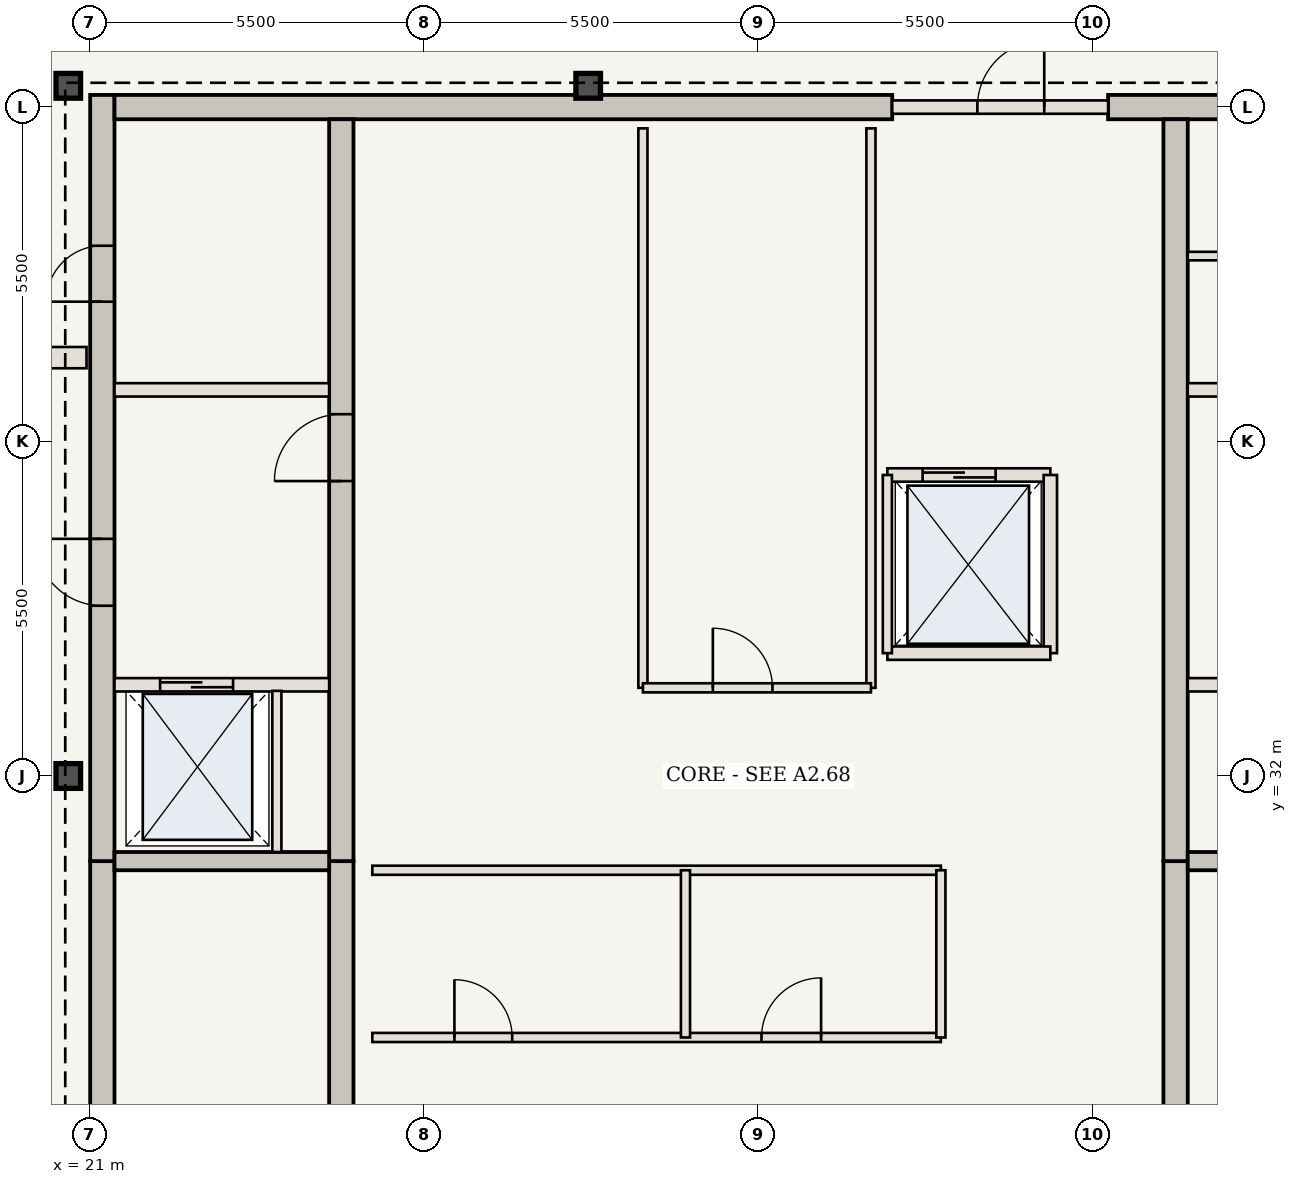
"""IFC4 building model, lengths in metres.
Left out: names, types, materials, properties, quantities, classifications, styles, units other than length and angle.
Written with IfcOpenShell. Run it as: python <this file> out.ifc"""

import sys

from ifc_helpers import new_model, si_unit, direction, frame, frame_2d, origin, origin_2d, place, context, subcontext, project, spatial, rectangle, i_section, extrude, element, fill, save


model = new_model("IFC4")
c1 = context("Model", 3, precision=1e-05, world=origin(), true_north=direction((0.0, 1.0)))
c2 = subcontext(c1, "Body", "Model", "MODEL_VIEW")
j1 = project(units=[si_unit("LENGTHUNIT", "METRE"), si_unit("PLANEANGLEUNIT", "RADIAN")], contexts=[c1])
p1 = place(None, origin())
s1 = spatial("IfcSite", under=j1, at=p1, CompositionType="ELEMENT")
p2 = place(p1, origin())
s2 = spatial("IfcBuilding", under=s1, at=p2, CompositionType="ELEMENT")
p3 = place(p2, frame((0.0, 0.0, 317.8)))
s3 = spatial("IfcBuildingStorey", under=s2, at=p3, CompositionType="ELEMENT", Elevation=317.8)
p4 = place(p3, frame((21.21, 20.75, 0.0), z_axis=(0.0, 0.0, 1.0), x_axis=(0.0, 1.0, 0.0)))
e1 = element("IfcWall", 1, at=p4, inside=s3, PredefinedType="SHEAR", context=c2, shape_type="SweptSolid", body=[
    extrude(rectangle(XDim=9.85, YDim=0.4, at=frame_2d((4.925, 0.0))), origin(), (0.0, 0.0, 1.0), 4.55),
])
p5 = place(p4, frame((1.0, 0.0, 0.0)))
e2 = element("IfcOpeningElement", 2, at=p5, cuts=e1, PredefinedType="OPENING", context=c2, shape_type="SweptSolid", body=[
    extrude(rectangle(XDim=1.15, YDim=2.15, at=frame_2d((0.575, 1.075))), frame((0.0, 0.21, 0.0), z_axis=(0.0, -1.0, 0.0), x_axis=(1.0, 0.0, 0.0)), (0.0, 0.0, 1.0), 0.42),
])
p6 = place(p3, frame((21.21, 30.6, 0.0), z_axis=(0.0, 0.0, 1.0), x_axis=(0.0, 1.0, 0.0)))
e3 = element("IfcWall", 3, at=p6, inside=s3, PredefinedType="SHEAR", context=c2, shape_type="SweptSolid", body=[
    extrude(rectangle(XDim=12.6, YDim=0.4, at=frame_2d((6.3, 0.0))), origin(), (0.0, 0.0, 1.0), 4.55),
])
p7 = place(p6, frame((4.2, 0.0, 0.0)))
e4 = element("IfcOpeningElement", 4, at=p7, cuts=e3, PredefinedType="OPENING", context=c2, shape_type="SweptSolid", body=[
    extrude(rectangle(XDim=1.1, YDim=2.15, at=frame_2d((0.55, 1.075))), frame((0.0, 0.21, 0.0), z_axis=(0.0, -1.0, 0.0), x_axis=(1.0, 0.0, 0.0)), (0.0, 0.0, 1.0), 0.42),
])
p8 = place(p6, frame((9.2, 0.0, 0.0)))
e5 = element("IfcOpeningElement", 5, at=p8, cuts=e3, PredefinedType="OPENING", context=c2, shape_type="SweptSolid", body=[
    extrude(rectangle(XDim=0.92, YDim=2.1, at=frame_2d((0.46, 1.05))), frame((0.0, 0.21, 0.0), z_axis=(0.0, -1.0, 0.0), x_axis=(1.0, 0.0, 0.0)), (0.0, 0.0, 1.0), 0.42),
])
p9 = place(p3, frame((21.41, 43.0, 0.0), z_axis=(0.0, 0.0, 1.0), x_axis=(1.0, 0.0, 0.0)))
e6 = element("IfcWall", 6, at=p9, inside=s3, PredefinedType="SHEAR", context=c2, shape_type="SweptSolid", body=[
    extrude(rectangle(XDim=12.79, YDim=0.4, at=frame_2d((6.395, 0.0))), origin(), (0.0, 0.0, 1.0), 4.55),
])
p10 = place(p3, frame((37.75, 43.0, 0.0), z_axis=(0.0, 0.0, 1.0), x_axis=(1.0, 0.0, 0.0)))
e7 = element("IfcWall", 7, at=p10, inside=s3, PredefinedType="SHEAR", context=c2, shape_type="SweptSolid", body=[
    extrude(rectangle(XDim=4.84, YDim=0.4, at=frame_2d((2.42, 0.0))), origin(), (0.0, 0.0, 1.0), 4.55),
])
p11 = place(p3, frame((25.14, 21.15, 0.0), z_axis=(0.0, 0.0, 1.0), x_axis=(0.0, 1.0, 0.0)))
e8 = element("IfcWall", 8, at=p11, inside=s3, PredefinedType="SHEAR", context=c2, shape_type="SweptSolid", body=[
    extrude(rectangle(XDim=9.45, YDim=0.4, at=frame_2d((4.725, 0.0))), origin(), (0.0, 0.0, 1.0), 4.55),
])
p12 = place(p3, frame((25.14, 30.6, 0.0), z_axis=(0.0, 0.0, 1.0), x_axis=(0.0, 1.0, 0.0)))
e9 = element("IfcWall", 9, at=p12, inside=s3, PredefinedType="SHEAR", context=c2, shape_type="SweptSolid", body=[
    extrude(rectangle(XDim=12.2, YDim=0.4, at=frame_2d((6.1, 0.0))), origin(), (0.0, 0.0, 1.0), 4.55),
])
p13 = place(p12, frame((6.25, 0.0, 0.0)))
e10 = element("IfcOpeningElement", 10, at=p13, cuts=e9, PredefinedType="OPENING", context=c2, shape_type="SweptSolid", body=[
    extrude(rectangle(XDim=1.1, YDim=2.15, at=frame_2d((0.55, 1.075))), frame((0.0, 0.21, 0.0), z_axis=(0.0, -1.0, 0.0), x_axis=(1.0, 0.0, 0.0)), (0.0, 0.0, 1.0), 0.42),
])
p14 = place(p3, frame((38.86, 21.15, 0.0), z_axis=(0.0, 0.0, 1.0), x_axis=(0.0, 1.0, 0.0)))
e11 = element("IfcWall", 11, at=p14, inside=s3, PredefinedType="SHEAR", context=c2, shape_type="SweptSolid", body=[
    extrude(rectangle(XDim=9.45, YDim=0.4, at=frame_2d((4.725, 0.0))), origin(), (0.0, 0.0, 1.0), 4.55),
])
p15 = place(p3, frame((38.86, 30.6, 0.0), z_axis=(0.0, 0.0, 1.0), x_axis=(0.0, 1.0, 0.0)))
e12 = element("IfcWall", 12, at=p15, inside=s3, PredefinedType="SHEAR", context=c2, shape_type="SweptSolid", body=[
    extrude(rectangle(XDim=12.2, YDim=0.4, at=frame_2d((6.1, 0.0))), origin(), (0.0, 0.0, 1.0), 4.55),
])
for number, where, z_axis, x_axis in (
    (13, (29.2, 43.35, 0.0), (0.0, 0.0, 1.0), (1.0, 0.0, 0.0)),
    (14, (20.65, 43.35, 0.0), (0.0, 0.0, 1.0), (1.0, 0.0, 0.0)),
    (15, (20.65, 32.0, 0.0), (0.0, 0.0, 1.0), (1.0, 0.0, 0.0)),
):
    element("IfcColumn", number, at=place(p3, frame(where, z_axis=z_axis, x_axis=x_axis)), inside=s3, PredefinedType="COLUMN", context=c2, shape_type="SweptSolid", body=[
        extrude(i_section(OverallWidth=0.404, OverallDepth=0.407, WebThickness=0.027, FlangeThickness=0.044, at=origin_2d()), origin(), (0.0, 0.0, 1.0), 4.55),
    ])
for number, where, z_axis, x_axis in (
    (16, (21.41, 30.6, 0.0), (0.0, 0.0, 1.0), (1.0, 0.0, 0.0)),
    (17, (39.06, 30.6, 0.0), (0.0, 0.0, 1.0), (1.0, 0.0, 0.0)),
):
    element("IfcWall", number, at=place(p3, frame(where, z_axis=z_axis, x_axis=x_axis)), inside=s3, PredefinedType="SHEAR", context=c2, shape_type="SweptSolid", body=[
        extrude(rectangle(XDim=3.53, YDim=0.3, at=frame_2d((1.765, 0.0))), origin(), (0.0, 0.0, 1.0), 4.29),
    ])
p16 = place(p3, frame((21.41, 33.5, 0.0), z_axis=(0.0, 0.0, 1.0), x_axis=(1.0, 0.0, 0.0)))
e18 = element("IfcWall", 18, at=p16, inside=s3, PredefinedType="STANDARD", context=c2, shape_type="SweptSolid", body=[
    extrude(rectangle(XDim=3.53, YDim=0.22, at=frame_2d((1.765, 0.0))), origin(), (0.0, 0.0, 1.0), 4.29),
])
p17 = place(p16, frame((0.75, 0.0, 0.0)))
e19 = element("IfcOpeningElement", 19, at=p17, cuts=e18, PredefinedType="OPENING", context=c2, shape_type="SweptSolid", body=[
    extrude(rectangle(XDim=1.2, YDim=2.2, at=frame_2d((0.6, 1.1))), frame((0.0, 0.12, 0.0), z_axis=(0.0, -1.0, 0.0), x_axis=(1.0, 0.0, 0.0)), (0.0, 0.0, 1.0), 0.24),
])
p18 = place(p3, frame((24.08, 30.75, 0.0), z_axis=(0.0, 0.0, 1.0), x_axis=(0.0, 1.0, 0.0)))
e20 = element("IfcWall", 20, at=p18, inside=s3, PredefinedType="STANDARD", context=c2, shape_type="SweptSolid", body=[
    extrude(rectangle(XDim=2.65, YDim=0.15, at=frame_2d((1.325, 0.0))), origin(), (0.0, 0.0, 1.0), 4.29),
])
p19 = place(p3, frame((39.06, 33.5, 0.0), z_axis=(0.0, 0.0, 1.0), x_axis=(1.0, 0.0, 0.0)))
e21 = element("IfcWall", 21, at=p19, inside=s3, PredefinedType="STANDARD", context=c2, shape_type="SweptSolid", body=[
    extrude(rectangle(XDim=3.53, YDim=0.22, at=frame_2d((1.765, 0.0))), origin(), (0.0, 0.0, 1.0), 4.29),
])
p20 = place(p19, frame((1.55, 0.0, 0.0)))
e22 = element("IfcOpeningElement", 22, at=p20, cuts=e21, PredefinedType="OPENING", context=c2, shape_type="SweptSolid", body=[
    extrude(rectangle(XDim=1.2, YDim=2.2, at=frame_2d((0.6, 1.1))), frame((0.0, 0.12, 0.0), z_axis=(0.0, -1.0, 0.0), x_axis=(1.0, 0.0, 0.0)), (0.0, 0.0, 1.0), 0.24),
])
for number, where, z_axis, x_axis in (
    (23, (21.41, 38.35, 0.0), (0.0, 0.0, 1.0), (1.0, 0.0, 0.0)),
    (24, (39.06, 38.35, 0.0), (0.0, 0.0, 1.0), (1.0, 0.0, 0.0)),
):
    element("IfcWall", number, at=place(p3, frame(where, z_axis=z_axis, x_axis=x_axis)), inside=s3, PredefinedType="STANDARD", context=c2, shape_type="SweptSolid", body=[
        extrude(rectangle(XDim=3.53, YDim=0.22, at=frame_2d((1.765, 0.0))), origin(), (0.0, 0.0, 1.0), 4.29),
    ])
p21 = place(p3, frame((39.06, 40.55, 0.0), z_axis=(0.0, 0.0, 1.0), x_axis=(1.0, 0.0, 0.0)))
e25 = element("IfcWall", 25, at=p21, inside=s3, PredefinedType="STANDARD", context=c2, shape_type="SweptSolid", body=[
    extrude(rectangle(XDim=3.53, YDim=0.14, at=frame_2d((1.765, 0.0))), origin(), (0.0, 0.0, 1.0), 4.29),
])
p22 = place(p3, frame((25.65, 27.7, 0.0), z_axis=(0.0, 0.0, 1.0), x_axis=(1.0, 0.0, 0.0)))
e26 = element("IfcWall", 26, at=p22, inside=s3, PredefinedType="STANDARD", context=c2, shape_type="SweptSolid", body=[
    extrude(rectangle(XDim=9.35, YDim=0.15, at=frame_2d((4.675, 0.0))), origin(), (0.0, 0.0, 1.0), 4.29),
])
p23 = place(p22, frame((1.35, 0.0, 0.0)))
e27 = element("IfcOpeningElement", 27, at=p23, cuts=e26, PredefinedType="OPENING", context=c2, shape_type="SweptSolid", body=[
    extrude(rectangle(XDim=0.95, YDim=2.15, at=frame_2d((0.475, 1.075))), frame((0.0, 0.085, 0.0), z_axis=(0.0, -1.0, 0.0), x_axis=(1.0, 0.0, 0.0)), (0.0, 0.0, 1.0), 0.17),
])
p24 = place(p22, frame((6.4, 0.0, 0.0)))
e28 = element("IfcOpeningElement", 28, at=p24, cuts=e26, PredefinedType="OPENING", context=c2, shape_type="SweptSolid", body=[
    extrude(rectangle(XDim=0.98, YDim=2.2, at=frame_2d((0.49, 1.1))), frame((0.0, 0.085, 0.0), z_axis=(0.0, -1.0, 0.0), x_axis=(1.0, 0.0, 0.0)), (0.0, 0.0, 1.0), 0.17),
])
p25 = place(p3, frame((25.65, 30.45, 0.0), z_axis=(0.0, 0.0, 1.0), x_axis=(1.0, 0.0, 0.0)))
e29 = element("IfcWall", 29, at=p25, inside=s3, PredefinedType="STANDARD", context=c2, shape_type="SweptSolid", body=[
    extrude(rectangle(XDim=9.35, YDim=0.15, at=frame_2d((4.675, 0.0))), origin(), (0.0, 0.0, 1.0), 4.29),
])
for number, where, z_axis, x_axis in (
    (30, (30.8, 27.7, 0.0), (0.0, 0.0, 1.0), (0.0, 1.0, 0.0)),
    (31, (35.0, 27.7, 0.0), (0.0, 0.0, 1.0), (0.0, 1.0, 0.0)),
):
    element("IfcWall", number, at=place(p3, frame(where, z_axis=z_axis, x_axis=x_axis)), inside=s3, PredefinedType="STANDARD", context=c2, shape_type="SweptSolid", body=[
        extrude(rectangle(XDim=2.75, YDim=0.15, at=frame_2d((1.375, 0.0))), origin(), (0.0, 0.0, 1.0), 4.29),
    ])
for number, where, z_axis, x_axis in (
    (32, (30.1, 33.45, 0.0), (0.0, 0.0, 1.0), (0.0, 1.0, 0.0)),
    (33, (33.85, 33.45, 0.0), (0.0, 0.0, 1.0), (0.0, 1.0, 0.0)),
):
    element("IfcWall", number, at=place(p3, frame(where, z_axis=z_axis, x_axis=x_axis)), inside=s3, PredefinedType="STANDARD", context=c2, shape_type="SweptSolid", body=[
        extrude(rectangle(XDim=9.2, YDim=0.15, at=frame_2d((4.6, 0.0))), origin(), (0.0, 0.0, 1.0), 4.29),
    ])
p26 = place(p3, frame((30.1, 33.45, 0.0), z_axis=(0.0, 0.0, 1.0), x_axis=(1.0, 0.0, 0.0)))
e34 = element("IfcWall", 34, at=p26, inside=s3, PredefinedType="STANDARD", context=c2, shape_type="SweptSolid", body=[
    extrude(rectangle(XDim=3.75, YDim=0.15, at=frame_2d((1.875, 0.0))), origin(), (0.0, 0.0, 1.0), 4.29),
])
p27 = place(p26, frame((1.15, 0.0, 0.0)))
e35 = element("IfcOpeningElement", 35, at=p27, cuts=e34, PredefinedType="OPENING", context=c2, shape_type="SweptSolid", body=[
    extrude(rectangle(XDim=0.98, YDim=2.2, at=frame_2d((0.49, 1.1))), frame((0.0, 0.085, 0.0), z_axis=(0.0, -1.0, 0.0), x_axis=(1.0, 0.0, 0.0)), (0.0, 0.0, 1.0), 0.17),
])
p28 = place(p3, frame((34.2, 43.0, 0.0), z_axis=(0.0, 0.0, 1.0), x_axis=(1.0, 0.0, 0.0)))
e36 = element("IfcWall", 36, at=p28, inside=s3, PredefinedType="STANDARD", context=c2, shape_type="SweptSolid", body=[
    extrude(rectangle(XDim=3.55, YDim=0.22, at=frame_2d((1.775, 0.0))), origin(), (0.0, 0.0, 1.0), 4.29),
])
p29 = place(p28, frame((1.4, 0.0, 0.0)))
e37 = element("IfcOpeningElement", 37, at=p29, cuts=e36, PredefinedType="OPENING", context=c2, shape_type="SweptSolid", body=[
    extrude(rectangle(XDim=1.1, YDim=2.15, at=frame_2d((0.55, 1.075))), frame((0.0, 0.12, 0.0), z_axis=(0.0, -1.0, 0.0), x_axis=(1.0, 0.0, 0.0)), (0.0, 0.0, 1.0), 0.24),
])
p30 = place(p3, frame((34.12, 36.95, 0.0), z_axis=(0.0, 0.0, 1.0), x_axis=(1.0, 0.0, 0.0)))
e38 = element("IfcWall", 38, at=p30, inside=s3, PredefinedType="STANDARD", context=c2, shape_type="SweptSolid", body=[
    extrude(rectangle(XDim=2.68, YDim=0.22, at=frame_2d((1.34, 0.0))), origin(), (0.0, 0.0, 1.0), 4.29),
])
p31 = place(p30, frame((0.58, 0.0, 0.0)))
e39 = element("IfcOpeningElement", 39, at=p31, cuts=e38, PredefinedType="OPENING", context=c2, shape_type="SweptSolid", body=[
    extrude(rectangle(XDim=1.2, YDim=2.2, at=frame_2d((0.6, 1.1))), frame((0.0, 0.12, 0.0), z_axis=(0.0, -1.0, 0.0), x_axis=(1.0, 0.0, 0.0)), (0.0, 0.0, 1.0), 0.24),
])
p32 = place(p3, frame((36.8, 34.02, 0.0), z_axis=(0.0, 0.0, 1.0), x_axis=(0.0, 1.0, 0.0)))
e40 = element("IfcWall", 40, at=p32, inside=s3, PredefinedType="STANDARD", context=c2, shape_type="SweptSolid", body=[
    extrude(rectangle(XDim=2.93, YDim=0.22, at=frame_2d((1.465, 0.0))), origin(), (0.0, 0.0, 1.0), 4.29),
])
p33 = place(p3, frame((34.12, 34.02, 0.0), z_axis=(0.0, 0.0, 1.0), x_axis=(1.0, 0.0, 0.0)))
e41 = element("IfcWall", 41, at=p33, inside=s3, PredefinedType="STANDARD", context=c2, shape_type="SweptSolid", body=[
    extrude(rectangle(XDim=2.68, YDim=0.22, at=frame_2d((1.34, 0.0))), origin(), (0.0, 0.0, 1.0), 4.29),
])
p34 = place(p3, frame((34.12, 34.02, 0.0), z_axis=(0.0, 0.0, 1.0), x_axis=(0.0, 1.0, 0.0)))
e42 = element("IfcWall", 42, at=p34, inside=s3, PredefinedType="STANDARD", context=c2, shape_type="SweptSolid", body=[
    extrude(rectangle(XDim=2.93, YDim=0.15, at=frame_2d((1.465, 0.0))), origin(), (0.0, 0.0, 1.0), 4.29),
])
p35 = place(p3, frame((18.4, 38.88, 0.0), z_axis=(0.0, 0.0, 1.0), x_axis=(1.0, 0.0, 0.0)))
e43 = element("IfcWall", 43, at=p35, inside=s3, PredefinedType="STANDARD", context=c2, shape_type="SweptSolid", body=[
    extrude(rectangle(XDim=2.55, YDim=0.35, at=frame_2d((1.275, 0.0))), origin(), (0.0, 0.0, 1.0), 4.29),
])
p36 = place(p35, frame((0.65, 0.0, 0.0)))
e44 = element("IfcOpeningElement", 44, at=p36, cuts=e43, PredefinedType="OPENING", context=c2, shape_type="SweptSolid", body=[
    extrude(rectangle(XDim=1.1, YDim=2.15, at=frame_2d((0.55, 1.075))), frame((0.0, 0.185, 0.0), z_axis=(0.0, -1.0, 0.0), x_axis=(1.0, 0.0, 0.0)), (0.0, 0.0, 1.0), 0.37),
])
p37 = place(p7, origin())
e45 = element("IfcDoor", 45, at=p37, inside=s3, OperationType="SINGLE_SWING_RIGHT", PredefinedType="DOOR", context=c2, shape_type="SweptSolid", body=[
    extrude(rectangle(XDim=1.1, YDim=2.15, at=frame_2d((0.55, 1.075))), frame((0.0, 0.025, 0.0), z_axis=(0.0, -1.0, 0.0), x_axis=(1.0, 0.0, 0.0)), (0.0, 0.0, 1.0), 0.05),
])
fill(e4, e45)
p38 = place(p13, origin())
e46 = element("IfcDoor", 46, at=p38, inside=s3, OperationType="SINGLE_SWING_LEFT", PredefinedType="DOOR", context=c2, shape_type="SweptSolid", body=[
    extrude(rectangle(XDim=1.1, YDim=2.15, at=frame_2d((0.55, 1.075))), frame((0.0, 0.025, 0.0), z_axis=(0.0, -1.0, 0.0), x_axis=(1.0, 0.0, 0.0)), (0.0, 0.0, 1.0), 0.05),
])
fill(e10, e46)
p39 = place(p8, origin())
e47 = element("IfcDoor", 47, at=p39, inside=s3, OperationType="SINGLE_SWING_LEFT", PredefinedType="DOOR", context=c2, shape_type="SweptSolid", body=[
    extrude(rectangle(XDim=0.92, YDim=2.1, at=frame_2d((0.46, 1.05))), frame((0.0, 0.025, 0.0), z_axis=(0.0, -1.0, 0.0), x_axis=(1.0, 0.0, 0.0)), (0.0, 0.0, 1.0), 0.05),
])
fill(e5, e47)
p40 = place(p17, origin())
e48 = element("IfcDoor", 48, at=p40, inside=s3, OperationType="DOUBLE_DOOR_SLIDING", PredefinedType="DOOR", context=c2, shape_type="SweptSolid", body=[
    extrude(rectangle(XDim=1.2, YDim=2.2, at=frame_2d((0.6, 1.1))), frame((0.0, 0.025, 0.0), z_axis=(0.0, -1.0, 0.0), x_axis=(1.0, 0.0, 0.0)), (0.0, 0.0, 1.0), 0.05),
])
fill(e19, e48)
p41 = place(p23, origin())
e49 = element("IfcDoor", 49, at=p41, inside=s3, OperationType="SINGLE_SWING_LEFT", PredefinedType="DOOR", context=c2, shape_type="SweptSolid", body=[
    extrude(rectangle(XDim=0.95, YDim=2.15, at=frame_2d((0.475, 1.075))), frame((0.0, 0.025, 0.0), z_axis=(0.0, -1.0, 0.0), x_axis=(1.0, 0.0, 0.0)), (0.0, 0.0, 1.0), 0.05),
])
fill(e27, e49)
p42 = place(p24, origin())
e50 = element("IfcDoor", 50, at=p42, inside=s3, OperationType="SINGLE_SWING_RIGHT", PredefinedType="DOOR", context=c2, shape_type="SweptSolid", body=[
    extrude(rectangle(XDim=0.98, YDim=2.2, at=frame_2d((0.49, 1.1))), frame((0.0, 0.025, 0.0), z_axis=(0.0, -1.0, 0.0), x_axis=(1.0, 0.0, 0.0)), (0.0, 0.0, 1.0), 0.05),
])
fill(e28, e50)
p43 = place(p27, origin())
e51 = element("IfcDoor", 51, at=p43, inside=s3, OperationType="SINGLE_SWING_LEFT", PredefinedType="DOOR", context=c2, shape_type="SweptSolid", body=[
    extrude(rectangle(XDim=0.98, YDim=2.2, at=frame_2d((0.49, 1.1))), frame((0.0, 0.025, 0.0), z_axis=(0.0, -1.0, 0.0), x_axis=(1.0, 0.0, 0.0)), (0.0, 0.0, 1.0), 0.05),
])
fill(e35, e51)
p44 = place(p29, origin())
e52 = element("IfcDoor", 52, at=p44, inside=s3, OperationType="SINGLE_SWING_RIGHT", PredefinedType="DOOR", context=c2, shape_type="SweptSolid", body=[
    extrude(rectangle(XDim=1.1, YDim=2.15, at=frame_2d((0.55, 1.075))), frame((0.0, 0.025, 0.0), z_axis=(0.0, -1.0, 0.0), x_axis=(1.0, 0.0, 0.0)), (0.0, 0.0, 1.0), 0.05),
])
fill(e37, e52)
p45 = place(p31, origin())
e53 = element("IfcDoor", 53, at=p45, inside=s3, OperationType="DOUBLE_DOOR_SLIDING", PredefinedType="DOOR", context=c2, shape_type="SweptSolid", body=[
    extrude(rectangle(XDim=1.2, YDim=2.2, at=frame_2d((0.6, 1.1))), frame((0.0, 0.025, 0.0), z_axis=(0.0, -1.0, 0.0), x_axis=(1.0, 0.0, 0.0)), (0.0, 0.0, 1.0), 0.05),
])
fill(e39, e53)
save(model, sys.argv[1])
